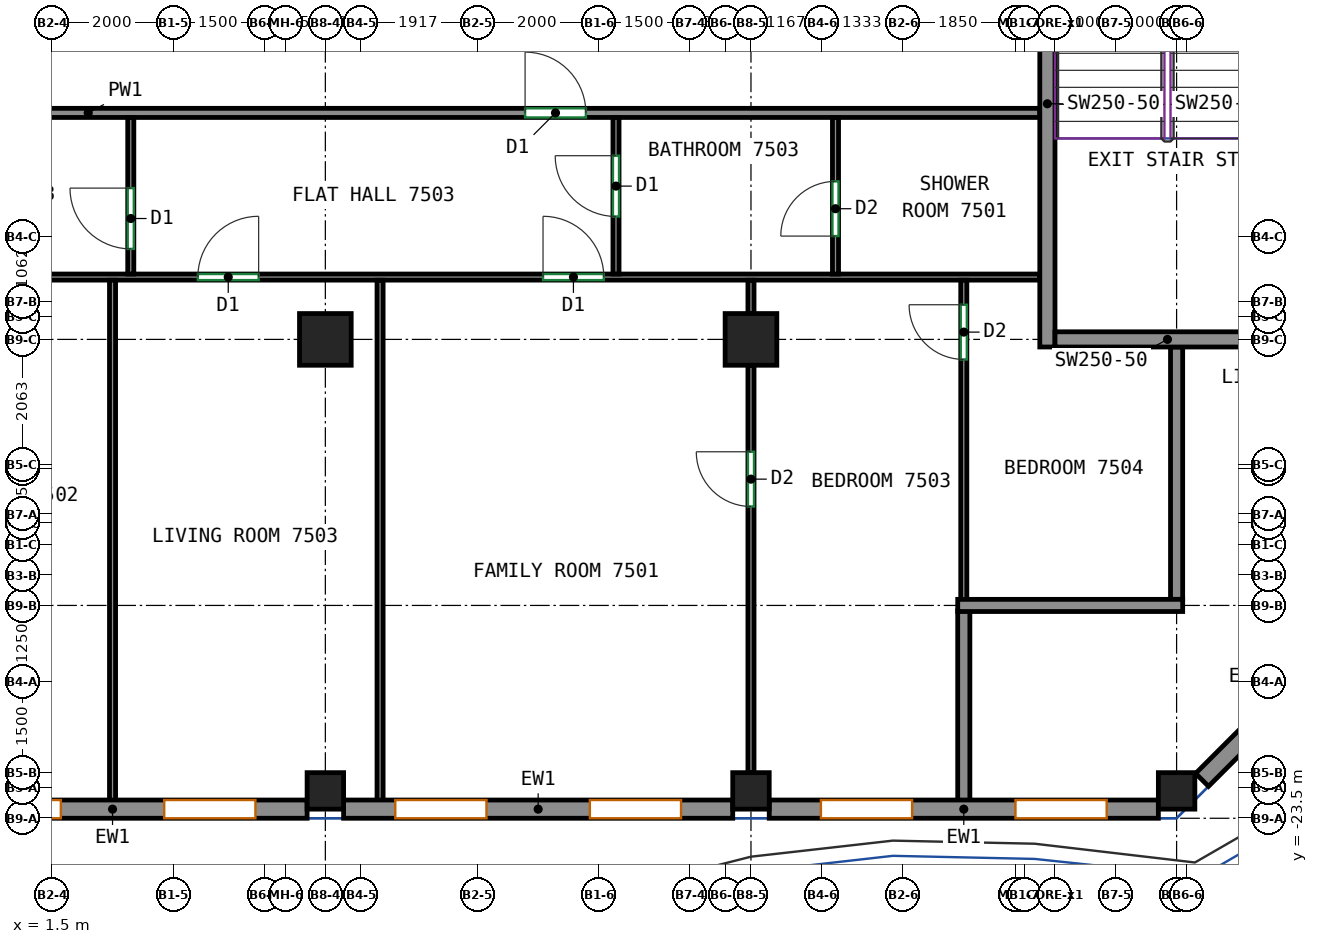
"""IFC4 building model, lengths in metres.
Left out: names, types, materials, properties, quantities, classifications, styles, units other than length and angle.
Written with IfcOpenShell. Run it as: python <this file> out.ifc"""

import sys

from ifc_helpers import new_model, si_unit, direction, frame, frame_2d, origin, origin_2d, place, context, subcontext, project, spatial, rectangle, extrude, source, transform, mapped, element, fill, save


model = new_model("IFC4")
c1 = context("Model", 3, precision=1e-05, world=origin(), true_north=direction((0.0, 1.0)))
c2 = subcontext(c1, "Body", "Model", "MODEL_VIEW")
j1 = project(units=[si_unit("LENGTHUNIT", "METRE"), si_unit("PLANEANGLEUNIT", "RADIAN")], contexts=[c1])
p1 = place(None, origin())
s1 = spatial("IfcSite", under=j1, at=p1, CompositionType="ELEMENT")
p2 = place(p1, origin())
s2 = spatial("IfcBuilding", under=s1, at=p2, CompositionType="ELEMENT")
p3 = place(p2, frame((0.0, 0.0, 301.8)))
s3 = spatial("IfcBuildingStorey", under=s2, at=p3, CompositionType="ELEMENT", Elevation=301.8)
m1 = source(origin(), c2, "Body", "SweptSolid", [
    extrude(rectangle(XDim=0.6, YDim=0.6, at=origin_2d()), origin(), (0.0, 0.0, 1.0), 3.12),
])
p4 = place(p3, frame((6.0, -23.05, 0.0), z_axis=(0.0, 0.0, 1.0), x_axis=(1.0, 0.0, 0.0)))
e1 = element("IfcColumn", 1, at=p4, inside=s3, PredefinedType="COLUMN", context=c2, shape_type="MappedRepresentation", body=[
    mapped(m1, transform((0.0, 0.0, 0.0))),
])
m2 = source(origin(), c2, "Body", "SweptSolid", [
    extrude(rectangle(XDim=0.85, YDim=0.85, at=origin_2d()), origin(), (0.0, 0.0, 1.0), 3.12),
])
p5 = place(p3, frame((6.0, -15.625, 0.0), z_axis=(0.0, 0.0, 1.0), x_axis=(1.0, 0.0, 0.0)))
e2 = element("IfcColumn", 2, at=p5, inside=s3, PredefinedType="COLUMN", context=c2, shape_type="MappedRepresentation", body=[
    mapped(m2, transform((0.0, 0.0, 0.0))),
])
p6 = place(p3, frame((13.0, -23.05, 0.0), z_axis=(0.0, 0.0, 1.0), x_axis=(1.0, 0.0, 0.0)))
e3 = element("IfcColumn", 3, at=p6, inside=s3, PredefinedType="COLUMN", context=c2, shape_type="MappedRepresentation", body=[
    mapped(m1, transform((0.0, 0.0, 0.0))),
])
p7 = place(p3, frame((13.0, -15.625, 0.0), z_axis=(0.0, 0.0, 1.0), x_axis=(1.0, 0.0, 0.0)))
e4 = element("IfcColumn", 4, at=p7, inside=s3, PredefinedType="COLUMN", context=c2, shape_type="MappedRepresentation", body=[
    mapped(m2, transform((0.0, 0.0, 0.0))),
])
p8 = place(p3, frame((20.0, -23.05, 0.0), z_axis=(0.0, 0.0, 1.0), x_axis=(1.0, 0.0, 0.0)))
e5 = element("IfcColumn", 5, at=p8, inside=s3, PredefinedType="COLUMN", context=c2, shape_type="MappedRepresentation", body=[
    mapped(m1, transform((0.0, 0.0, 0.0))),
])
m3 = source(origin(), c2, "Body", "SweptSolid", [
    extrude(rectangle(XDim=8.0, YDim=0.25, at=frame_2d((4.0, 0.0))), origin(), (0.0, 0.0, 1.0), 3.12),
])
p9 = place(p3, frame((17.875, -15.75, 0.0), z_axis=(0.0, 0.0, 1.0), x_axis=(0.0, 1.0, 0.0)))
e6 = element("IfcWall", 6, at=p9, inside=s3, PredefinedType="SHEAR", context=c2, shape_type="MappedRepresentation", body=[
    mapped(m3, transform((0.0, 0.0, 0.0))),
])
m4 = source(origin(), c2, "Body", "SweptSolid", [
    extrude(rectangle(XDim=3.7, YDim=0.25, at=frame_2d((1.85, 0.0))), origin(), (0.0, 0.0, 1.0), 3.12),
])
p10 = place(p3, frame((18.0, -15.625, 0.0), z_axis=(0.0, 0.0, 1.0), x_axis=(1.0, 0.0, 0.0)))
e7 = element("IfcWall", 7, at=p10, inside=s3, PredefinedType="SHEAR", context=c2, shape_type="MappedRepresentation", body=[
    mapped(m4, transform((0.0, 0.0, 0.0))),
])
m5 = source(origin(), c2, "Body", "SweptSolid", [
    extrude(rectangle(XDim=6.4, YDim=0.3, at=frame_2d((3.2, 0.0))), origin(), (0.0, 0.0, 1.0), 3.12),
])
p11 = place(p3, frame((-0.7, -23.35, 0.0), z_axis=(0.0, 0.0, 1.0), x_axis=(1.0, 0.0, 0.0)))
e8 = element("IfcWall", 8, at=p11, inside=s3, PredefinedType="SOLIDWALL", context=c2, shape_type="MappedRepresentation", body=[
    mapped(m5, transform((0.0, 0.0, 0.0))),
])
p12 = place(p11, frame((0.85, 0.0, 0.8)))
e9 = element("IfcOpeningElement", 9, at=p12, cuts=e8, PredefinedType="OPENING", context=c2, shape_type="SweptSolid", body=[
    extrude(rectangle(XDim=1.5, YDim=2.05, at=frame_2d((0.75, 1.025))), frame((0.0, 0.16, 0.0), z_axis=(0.0, -1.0, 0.0), x_axis=(1.0, 0.0, 0.0)), (0.0, 0.0, 1.0), 0.32),
])
p13 = place(p11, frame((4.05, 0.0, 0.8)))
e10 = element("IfcOpeningElement", 10, at=p13, cuts=e8, PredefinedType="OPENING", context=c2, shape_type="SweptSolid", body=[
    extrude(rectangle(XDim=1.5, YDim=2.05, at=frame_2d((0.75, 1.025))), frame((0.0, 0.16, 0.0), z_axis=(0.0, -1.0, 0.0), x_axis=(1.0, 0.0, 0.0)), (0.0, 0.0, 1.0), 0.32),
])
p14 = place(p3, frame((6.3, -23.35, 0.0), z_axis=(0.0, 0.0, 1.0), x_axis=(1.0, 0.0, 0.0)))
e11 = element("IfcWall", 11, at=p14, inside=s3, PredefinedType="SOLIDWALL", context=c2, shape_type="MappedRepresentation", body=[
    mapped(m5, transform((0.0, 0.0, 0.0))),
])
p15 = place(p14, frame((0.85, 0.0, 0.8)))
e12 = element("IfcOpeningElement", 12, at=p15, cuts=e11, PredefinedType="OPENING", context=c2, shape_type="SweptSolid", body=[
    extrude(rectangle(XDim=1.5, YDim=2.05, at=frame_2d((0.75, 1.025))), frame((0.0, 0.16, 0.0), z_axis=(0.0, -1.0, 0.0), x_axis=(1.0, 0.0, 0.0)), (0.0, 0.0, 1.0), 0.32),
])
p16 = place(p14, frame((4.05, 0.0, 0.8)))
e13 = element("IfcOpeningElement", 13, at=p16, cuts=e11, PredefinedType="OPENING", context=c2, shape_type="SweptSolid", body=[
    extrude(rectangle(XDim=1.5, YDim=2.05, at=frame_2d((0.75, 1.025))), frame((0.0, 0.16, 0.0), z_axis=(0.0, -1.0, 0.0), x_axis=(1.0, 0.0, 0.0)), (0.0, 0.0, 1.0), 0.32),
])
p17 = place(p3, frame((13.3, -23.35, 0.0), z_axis=(0.0, 0.0, 1.0), x_axis=(1.0, 0.0, 0.0)))
e14 = element("IfcWall", 14, at=p17, inside=s3, PredefinedType="SOLIDWALL", context=c2, shape_type="MappedRepresentation", body=[
    mapped(m5, transform((0.0, 0.0, 0.0))),
])
p18 = place(p17, frame((0.85, 0.0, 0.8)))
e15 = element("IfcOpeningElement", 15, at=p18, cuts=e14, PredefinedType="OPENING", context=c2, shape_type="SweptSolid", body=[
    extrude(rectangle(XDim=1.5, YDim=2.05, at=frame_2d((0.75, 1.025))), frame((0.0, 0.16, 0.0), z_axis=(0.0, -1.0, 0.0), x_axis=(1.0, 0.0, 0.0)), (0.0, 0.0, 1.0), 0.32),
])
p19 = place(p17, frame((4.05, 0.0, 0.8)))
e16 = element("IfcOpeningElement", 16, at=p19, cuts=e14, PredefinedType="OPENING", context=c2, shape_type="SweptSolid", body=[
    extrude(rectangle(XDim=1.5, YDim=2.05, at=frame_2d((0.75, 1.025))), frame((0.0, 0.16, 0.0), z_axis=(0.0, -1.0, 0.0), x_axis=(1.0, 0.0, 0.0)), (0.0, 0.0, 1.0), 0.32),
])
m6 = source(origin(), c2, "Body", "SweptSolid", [
    extrude(rectangle(XDim=3.783, YDim=0.3, at=frame_2d((1.892, 0.0))), origin(), (0.0, 0.0, 1.0), 3.12),
])
p20 = place(p3, frame((20.419, -22.869, 0.0), z_axis=(0.0, 0.0, 1.0), x_axis=(0.707106781187, 0.707106781187, 0.0)))
e17 = element("IfcWall", 17, at=p20, inside=s3, PredefinedType="SOLIDWALL", context=c2, shape_type="MappedRepresentation", body=[
    mapped(m6, transform((0.0, 0.0, 0.0))),
])
p21 = place(p20, frame((1.75, 0.0, 0.8)))
e18 = element("IfcOpeningElement", 18, at=p21, cuts=e17, PredefinedType="OPENING", context=c2, shape_type="SweptSolid", body=[
    extrude(rectangle(XDim=1.5, YDim=2.05, at=frame_2d((0.75, 1.025))), frame((0.0, 0.16, 0.0), z_axis=(0.0, -1.0, 0.0), x_axis=(1.0, 0.0, 0.0)), (0.0, 0.0, 1.0), 0.32),
])
p22 = place(p3, frame((-13.55, -11.9, 0.0), z_axis=(0.0, 0.0, 1.0), x_axis=(1.0, 0.0, 0.0)))
e19 = element("IfcWall", 19, at=p22, inside=s3, PredefinedType="PARTITIONING", context=c2, shape_type="SweptSolid", body=[
    extrude(rectangle(XDim=31.3, YDim=0.15, at=frame_2d((15.65, 0.0))), origin(), (0.0, 0.0, 1.0), 3.12),
])
p23 = place(p22, frame((3.747, 0.0, 0.0)))
e20 = element("IfcOpeningElement", 20, at=p23, cuts=e19, PredefinedType="OPENING", context=c2, shape_type="SweptSolid", body=[
    extrude(rectangle(XDim=1.0, YDim=2.1, at=frame_2d((0.5, 1.05))), frame((0.0, 0.085, 0.0), z_axis=(0.0, -1.0, 0.0), x_axis=(1.0, 0.0, 0.0)), (0.0, 0.0, 1.0), 0.17),
])
p24 = place(p22, frame((22.835, 0.0, 0.0)))
e21 = element("IfcOpeningElement", 21, at=p24, cuts=e19, PredefinedType="OPENING", context=c2, shape_type="SweptSolid", body=[
    extrude(rectangle(XDim=1.0, YDim=2.1, at=frame_2d((0.5, 1.05))), frame((0.0, 0.085, 0.0), z_axis=(0.0, -1.0, 0.0), x_axis=(1.0, 0.0, 0.0)), (0.0, 0.0, 1.0), 0.17),
])
p25 = place(p3, frame((-13.55, -14.6, 0.0), z_axis=(0.0, 0.0, 1.0), x_axis=(1.0, 0.0, 0.0)))
e22 = element("IfcWall", 22, at=p25, inside=s3, PredefinedType="PARTITIONING", context=c2, shape_type="SweptSolid", body=[
    extrude(rectangle(XDim=31.3, YDim=0.1, at=frame_2d((15.65, 0.0))), origin(), (0.0, 0.0, 1.0), 3.12),
])
p26 = place(p25, frame((0.309, 0.0, 0.0)))
e23 = element("IfcOpeningElement", 23, at=p26, cuts=e22, PredefinedType="OPENING", context=c2, shape_type="SweptSolid", body=[
    extrude(rectangle(XDim=0.9, YDim=2.1, at=frame_2d((0.45, 1.05))), frame((0.0, 0.06, 0.0), z_axis=(0.0, -1.0, 0.0), x_axis=(1.0, 0.0, 0.0)), (0.0, 0.0, 1.0), 0.12),
])
p27 = place(p25, frame((4.103, 0.0, 0.0)))
e24 = element("IfcOpeningElement", 24, at=p27, cuts=e22, PredefinedType="OPENING", context=c2, shape_type="SweptSolid", body=[
    extrude(rectangle(XDim=1.0, YDim=2.1, at=frame_2d((0.5, 1.05))), frame((0.0, 0.06, 0.0), z_axis=(0.0, -1.0, 0.0), x_axis=(1.0, 0.0, 0.0)), (0.0, 0.0, 1.0), 0.12),
])
p28 = place(p25, frame((13.955, 0.0, 0.0)))
e25 = element("IfcOpeningElement", 25, at=p28, cuts=e22, PredefinedType="OPENING", context=c2, shape_type="SweptSolid", body=[
    extrude(rectangle(XDim=0.9, YDim=2.1, at=frame_2d((0.45, 1.05))), frame((0.0, 0.06, 0.0), z_axis=(0.0, -1.0, 0.0), x_axis=(1.0, 0.0, 0.0)), (0.0, 0.0, 1.0), 0.12),
])
p29 = place(p25, frame((17.453, 0.0, 0.0)))
e26 = element("IfcOpeningElement", 26, at=p29, cuts=e22, PredefinedType="OPENING", context=c2, shape_type="SweptSolid", body=[
    extrude(rectangle(XDim=1.0, YDim=2.1, at=frame_2d((0.5, 1.05))), frame((0.0, 0.06, 0.0), z_axis=(0.0, -1.0, 0.0), x_axis=(1.0, 0.0, 0.0)), (0.0, 0.0, 1.0), 0.12),
])
p30 = place(p25, frame((23.13, 0.0, 0.0)))
e27 = element("IfcOpeningElement", 27, at=p30, cuts=e22, PredefinedType="OPENING", context=c2, shape_type="SweptSolid", body=[
    extrude(rectangle(XDim=1.0, YDim=2.1, at=frame_2d((0.5, 1.05))), frame((0.0, 0.06, 0.0), z_axis=(0.0, -1.0, 0.0), x_axis=(1.0, 0.0, 0.0)), (0.0, 0.0, 1.0), 0.12),
])
p31 = place(p3, frame((2.8, -14.55, 0.0), z_axis=(0.0, 0.0, 1.0), x_axis=(0.0, 1.0, 0.0)))
e28 = element("IfcWall", 28, at=p31, inside=s3, PredefinedType="PARTITIONING", context=c2, shape_type="SweptSolid", body=[
    extrude(rectangle(XDim=2.573, YDim=0.1, at=frame_2d((1.287, 0.0))), origin(), (0.0, 0.0, 1.0), 3.12),
])
p32 = place(p31, frame((0.413, 0.0, 0.0)))
e29 = element("IfcOpeningElement", 29, at=p32, cuts=e28, PredefinedType="OPENING", context=c2, shape_type="SweptSolid", body=[
    extrude(rectangle(XDim=1.0, YDim=2.1, at=frame_2d((0.5, 1.05))), frame((0.0, 0.06, 0.0), z_axis=(0.0, -1.0, 0.0), x_axis=(1.0, 0.0, 0.0)), (0.0, 0.0, 1.0), 0.12),
])
p33 = place(p3, frame((10.78, -14.55, 0.0), z_axis=(0.0, 0.0, 1.0), x_axis=(0.0, 1.0, 0.0)))
e30 = element("IfcWall", 30, at=p33, inside=s3, PredefinedType="PARTITIONING", context=c2, shape_type="SweptSolid", body=[
    extrude(rectangle(XDim=2.573, YDim=0.1, at=frame_2d((1.287, 0.0))), origin(), (0.0, 0.0, 1.0), 3.12),
])
p34 = place(p33, frame((0.946, 0.0, 0.0)))
e31 = element("IfcOpeningElement", 31, at=p34, cuts=e30, PredefinedType="OPENING", context=c2, shape_type="SweptSolid", body=[
    extrude(rectangle(XDim=1.0, YDim=2.1, at=frame_2d((0.5, 1.05))), frame((0.0, 0.06, 0.0), z_axis=(0.0, -1.0, 0.0), x_axis=(1.0, 0.0, 0.0)), (0.0, 0.0, 1.0), 0.12),
])
p35 = place(p3, frame((14.39, -14.55, 0.0), z_axis=(0.0, 0.0, 1.0), x_axis=(0.0, 1.0, 0.0)))
e32 = element("IfcWall", 32, at=p35, inside=s3, PredefinedType="PARTITIONING", context=c2, shape_type="SweptSolid", body=[
    extrude(rectangle(XDim=2.573, YDim=0.1, at=frame_2d((1.287, 0.0))), origin(), (0.0, 0.0, 1.0), 3.12),
])
p36 = place(p35, frame((0.624, 0.0, 0.0)))
e33 = element("IfcOpeningElement", 33, at=p36, cuts=e32, PredefinedType="OPENING", context=c2, shape_type="SweptSolid", body=[
    extrude(rectangle(XDim=0.9, YDim=2.1, at=frame_2d((0.45, 1.05))), frame((0.0, 0.06, 0.0), z_axis=(0.0, -1.0, 0.0), x_axis=(1.0, 0.0, 0.0)), (0.0, 0.0, 1.0), 0.12),
])
for number, where, z_axis, x_axis in (
    (34, (2.5, -23.25, 0.0), (0.0, 0.0, 1.0), (0.0, 1.0, 0.0)),
    (35, (6.9, -23.25, 0.0), (0.0, 0.0, 1.0), (0.0, 1.0, 0.0)),
):
    element("IfcWall", number, at=place(p3, frame(where, z_axis=z_axis, x_axis=x_axis)), inside=s3, PredefinedType="PARTITIONING", context=c2, shape_type="SweptSolid", body=[
        extrude(rectangle(XDim=8.598, YDim=0.1, at=frame_2d((4.299, 0.0))), origin(), (0.0, 0.0, 1.0), 3.12),
    ])
p37 = place(p3, frame((13.0, -15.2, 0.0), z_axis=(0.0, 0.0, 1.0), x_axis=(0.0, 1.0, 0.0)))
e36 = element("IfcWall", 36, at=p37, inside=s3, PredefinedType="PARTITIONING", context=c2, shape_type="SweptSolid", body=[
    extrude(rectangle(XDim=0.548, YDim=0.1, at=frame_2d((0.274, 0.0))), origin(), (0.0, 0.0, 1.0), 3.12),
])
p38 = place(p3, frame((13.0, -22.75, 0.0), z_axis=(0.0, 0.0, 1.0), x_axis=(0.0, 1.0, 0.0)))
e37 = element("IfcWall", 37, at=p38, inside=s3, PredefinedType="PARTITIONING", context=c2, shape_type="SweptSolid", body=[
    extrude(rectangle(XDim=6.7, YDim=0.1, at=frame_2d((3.35, 0.0))), origin(), (0.0, 0.0, 1.0), 3.12),
])
p39 = place(p38, frame((4.377, 0.0, 0.0)))
e38 = element("IfcOpeningElement", 38, at=p39, cuts=e37, PredefinedType="OPENING", context=c2, shape_type="SweptSolid", body=[
    extrude(rectangle(XDim=0.9, YDim=2.1, at=frame_2d((0.45, 1.05))), frame((0.0, 0.06, 0.0), z_axis=(0.0, -1.0, 0.0), x_axis=(1.0, 0.0, 0.0)), (0.0, 0.0, 1.0), 0.12),
])
p40 = place(p3, frame((16.5, -19.91, 0.0), z_axis=(0.0, 0.0, 1.0), x_axis=(0.0, 1.0, 0.0)))
e39 = element("IfcWall", 39, at=p40, inside=s3, PredefinedType="PARTITIONING", context=c2, shape_type="SweptSolid", body=[
    extrude(rectangle(XDim=5.258, YDim=0.1, at=frame_2d((2.629, 0.0))), origin(), (0.0, 0.0, 1.0), 3.12),
])
p41 = place(p40, frame((3.955, 0.0, 0.0)))
e40 = element("IfcOpeningElement", 40, at=p41, cuts=e39, PredefinedType="OPENING", context=c2, shape_type="SweptSolid", body=[
    extrude(rectangle(XDim=0.9, YDim=2.1, at=frame_2d((0.45, 1.05))), frame((0.0, 0.06, 0.0), z_axis=(0.0, -1.0, 0.0), x_axis=(1.0, 0.0, 0.0)), (0.0, 0.0, 1.0), 0.12),
])
p42 = place(p3, frame((16.5, -23.25, 0.0), z_axis=(0.0, 0.0, 1.0), x_axis=(0.0, 1.0, 0.0)))
e41 = element("IfcWall", 41, at=p42, inside=s3, PredefinedType="PARTITIONING", context=c2, shape_type="SweptSolid", body=[
    extrude(rectangle(XDim=3.16, YDim=0.2, at=frame_2d((1.58, 0.0))), origin(), (0.0, 0.0, 1.0), 3.12),
])
p43 = place(p3, frame((20.0, -19.9, 0.0), z_axis=(0.0, 0.0, 1.0), x_axis=(0.0, 1.0, 0.0)))
e42 = element("IfcWall", 42, at=p43, inside=s3, PredefinedType="PARTITIONING", context=c2, shape_type="SweptSolid", body=[
    extrude(rectangle(XDim=4.15, YDim=0.2, at=frame_2d((2.075, 0.0))), origin(), (0.0, 0.0, 1.0), 3.12),
])
p44 = place(p3, frame((16.4, -20.0, 0.0), z_axis=(0.0, 0.0, 1.0), x_axis=(1.0, 0.0, 0.0)))
e43 = element("IfcWall", 43, at=p44, inside=s3, PredefinedType="PARTITIONING", context=c2, shape_type="SweptSolid", body=[
    extrude(rectangle(XDim=3.7, YDim=0.2, at=frame_2d((1.85, 0.0))), origin(), (0.0, 0.0, 1.0), 3.12),
])
p45 = place(p12, origin())
e44 = element("IfcWindow", 44, at=p45, inside=s3, PartitioningType="SINGLE_PANEL", PredefinedType="WINDOW", context=c2, shape_type="SweptSolid", body=[
    extrude(rectangle(XDim=1.5, YDim=2.05, at=frame_2d((0.75, 1.025))), frame((0.0, 0.03, 0.0), z_axis=(0.0, -1.0, 0.0), x_axis=(1.0, 0.0, 0.0)), (0.0, 0.0, 1.0), 0.06),
])
fill(e9, e44)
p46 = place(p13, origin())
e45 = element("IfcWindow", 45, at=p46, inside=s3, PartitioningType="SINGLE_PANEL", PredefinedType="WINDOW", context=c2, shape_type="SweptSolid", body=[
    extrude(rectangle(XDim=1.5, YDim=2.05, at=frame_2d((0.75, 1.025))), frame((0.0, 0.03, 0.0), z_axis=(0.0, -1.0, 0.0), x_axis=(1.0, 0.0, 0.0)), (0.0, 0.0, 1.0), 0.06),
])
fill(e10, e45)
p47 = place(p15, origin())
e46 = element("IfcWindow", 46, at=p47, inside=s3, PartitioningType="SINGLE_PANEL", PredefinedType="WINDOW", context=c2, shape_type="SweptSolid", body=[
    extrude(rectangle(XDim=1.5, YDim=2.05, at=frame_2d((0.75, 1.025))), frame((0.0, 0.03, 0.0), z_axis=(0.0, -1.0, 0.0), x_axis=(1.0, 0.0, 0.0)), (0.0, 0.0, 1.0), 0.06),
])
fill(e12, e46)
p48 = place(p16, origin())
e47 = element("IfcWindow", 47, at=p48, inside=s3, PartitioningType="SINGLE_PANEL", PredefinedType="WINDOW", context=c2, shape_type="SweptSolid", body=[
    extrude(rectangle(XDim=1.5, YDim=2.05, at=frame_2d((0.75, 1.025))), frame((0.0, 0.03, 0.0), z_axis=(0.0, -1.0, 0.0), x_axis=(1.0, 0.0, 0.0)), (0.0, 0.0, 1.0), 0.06),
])
fill(e13, e47)
p49 = place(p18, origin())
e48 = element("IfcWindow", 48, at=p49, inside=s3, PartitioningType="SINGLE_PANEL", PredefinedType="WINDOW", context=c2, shape_type="SweptSolid", body=[
    extrude(rectangle(XDim=1.5, YDim=2.05, at=frame_2d((0.75, 1.025))), frame((0.0, 0.03, 0.0), z_axis=(0.0, -1.0, 0.0), x_axis=(1.0, 0.0, 0.0)), (0.0, 0.0, 1.0), 0.06),
])
fill(e15, e48)
p50 = place(p19, origin())
e49 = element("IfcWindow", 49, at=p50, inside=s3, PartitioningType="SINGLE_PANEL", PredefinedType="WINDOW", context=c2, shape_type="SweptSolid", body=[
    extrude(rectangle(XDim=1.5, YDim=2.05, at=frame_2d((0.75, 1.025))), frame((0.0, 0.03, 0.0), z_axis=(0.0, -1.0, 0.0), x_axis=(1.0, 0.0, 0.0)), (0.0, 0.0, 1.0), 0.06),
])
fill(e16, e49)
p51 = place(p39, origin())
e50 = element("IfcDoor", 50, at=p51, inside=s3, OperationType="SINGLE_SWING_RIGHT", PredefinedType="DOOR", context=c2, shape_type="SweptSolid", body=[
    extrude(rectangle(XDim=0.9, YDim=2.1, at=frame_2d((0.45, 1.05))), frame((0.0, 0.025, 0.0), z_axis=(0.0, -1.0, 0.0), x_axis=(1.0, 0.0, 0.0)), (0.0, 0.0, 1.0), 0.05),
])
fill(e38, e50)
p52 = place(p41, origin())
e51 = element("IfcDoor", 51, at=p52, inside=s3, OperationType="SINGLE_SWING_RIGHT", PredefinedType="DOOR", context=c2, shape_type="SweptSolid", body=[
    extrude(rectangle(XDim=0.9, YDim=2.1, at=frame_2d((0.45, 1.05))), frame((0.0, 0.025, 0.0), z_axis=(0.0, -1.0, 0.0), x_axis=(1.0, 0.0, 0.0)), (0.0, 0.0, 1.0), 0.05),
])
fill(e40, e51)
p53 = place(p29, origin())
e52 = element("IfcDoor", 52, at=p53, inside=s3, OperationType="SINGLE_SWING_RIGHT", PredefinedType="DOOR", context=c2, shape_type="SweptSolid", body=[
    extrude(rectangle(XDim=1.0, YDim=2.1, at=frame_2d((0.5, 1.05))), frame((0.0, 0.025, 0.0), z_axis=(0.0, -1.0, 0.0), x_axis=(1.0, 0.0, 0.0)), (0.0, 0.0, 1.0), 0.05),
])
fill(e26, e52)
p54 = place(p30, origin())
e53 = element("IfcDoor", 53, at=p54, inside=s3, OperationType="SINGLE_SWING_LEFT", PredefinedType="DOOR", context=c2, shape_type="SweptSolid", body=[
    extrude(rectangle(XDim=1.0, YDim=2.1, at=frame_2d((0.5, 1.05))), frame((0.0, 0.025, 0.0), z_axis=(0.0, -1.0, 0.0), x_axis=(1.0, 0.0, 0.0)), (0.0, 0.0, 1.0), 0.05),
])
fill(e27, e53)
p55 = place(p32, origin())
e54 = element("IfcDoor", 54, at=p55, inside=s3, OperationType="SINGLE_SWING_RIGHT", PredefinedType="DOOR", context=c2, shape_type="SweptSolid", body=[
    extrude(rectangle(XDim=1.0, YDim=2.1, at=frame_2d((0.5, 1.05))), frame((0.0, 0.025, 0.0), z_axis=(0.0, -1.0, 0.0), x_axis=(1.0, 0.0, 0.0)), (0.0, 0.0, 1.0), 0.05),
])
fill(e29, e54)
p56 = place(p36, origin())
e55 = element("IfcDoor", 55, at=p56, inside=s3, OperationType="SINGLE_SWING_LEFT", PredefinedType="DOOR", context=c2, shape_type="SweptSolid", body=[
    extrude(rectangle(XDim=0.9, YDim=2.1, at=frame_2d((0.45, 1.05))), frame((0.0, 0.025, 0.0), z_axis=(0.0, -1.0, 0.0), x_axis=(1.0, 0.0, 0.0)), (0.0, 0.0, 1.0), 0.05),
])
fill(e33, e55)
p57 = place(p34, origin())
e56 = element("IfcDoor", 56, at=p57, inside=s3, OperationType="SINGLE_SWING_RIGHT", PredefinedType="DOOR", context=c2, shape_type="SweptSolid", body=[
    extrude(rectangle(XDim=1.0, YDim=2.1, at=frame_2d((0.5, 1.05))), frame((0.0, 0.025, 0.0), z_axis=(0.0, -1.0, 0.0), x_axis=(1.0, 0.0, 0.0)), (0.0, 0.0, 1.0), 0.05),
])
fill(e31, e56)
p58 = place(p24, origin())
e57 = element("IfcDoor", 57, at=p58, inside=s3, OperationType="SINGLE_SWING_LEFT", PredefinedType="DOOR", context=c2, shape_type="SweptSolid", body=[
    extrude(rectangle(XDim=1.0, YDim=2.1, at=frame_2d((0.5, 1.05))), frame((0.0, 0.025, 0.0), z_axis=(0.0, -1.0, 0.0), x_axis=(1.0, 0.0, 0.0)), (0.0, 0.0, 1.0), 0.05),
])
fill(e21, e57)
save(model, sys.argv[1])
